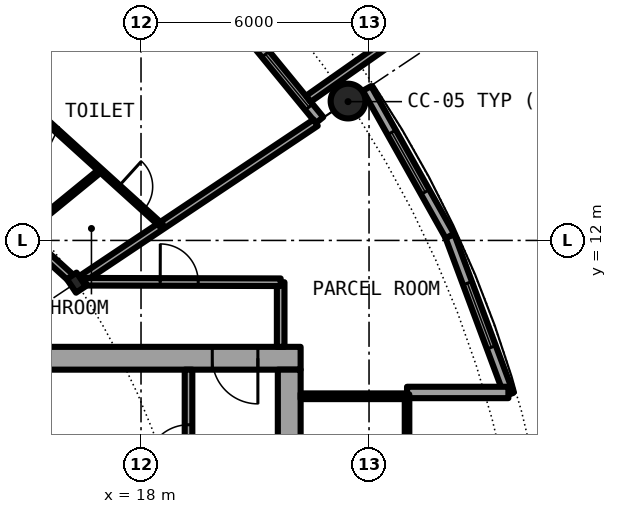
"""IFC4 building model, lengths in metres.
Left out: names, types, materials, properties, quantities, classifications, styles, units other than length and angle.
Written with IfcOpenShell. Run it as: python <this file> out.ifc"""

import sys

from ifc_helpers import new_model, si_unit, direction, frame, frame_2d, origin, origin_2d, place, context, subcontext, project, spatial, rectangle, hollow_circle, i_section, extrude, element, fill, save


model = new_model("IFC4")
c1 = context("Model", 3, precision=1e-05, world=origin(), true_north=direction((0.0, 1.0)))
c2 = subcontext(c1, "Body", "Model", "MODEL_VIEW")
j1 = project(units=[si_unit("LENGTHUNIT", "METRE"), si_unit("PLANEANGLEUNIT", "RADIAN")], contexts=[c1])
p1 = place(None, origin())
s1 = spatial("IfcSite", under=j1, at=p1, CompositionType="ELEMENT")
p2 = place(p1, origin())
s2 = spatial("IfcBuilding", under=s1, at=p2, CompositionType="ELEMENT")
p3 = place(p2, frame((0.0, 0.0, 129.95)))
s3 = spatial("IfcBuildingStorey", under=s2, at=p3, CompositionType="ELEMENT", Elevation=129.95)
p4 = place(p3, frame((23.448, 15.667, 0.0), z_axis=(0.0, 0.0, 1.0), x_axis=(1.0, 0.0, 0.0)))
e1 = element("IfcColumn", 1, at=p4, inside=s3, PredefinedType="COLUMN", context=c2, shape_type="SweptSolid", body=[
    extrude(hollow_circle(Radius=0.457, WallThickness=0.04, at=origin_2d()), origin(), (0.0, 0.0, 1.0), 3.05),
])
p5 = place(p3, frame((16.297, 10.889, 0.0), z_axis=(0.0, 0.0, 1.0), x_axis=(0.831469612303, 0.55557023302, 0.0)))
e2 = element("IfcColumn", 2, at=p5, inside=s3, PredefinedType="COLUMN", context=c2, shape_type="SweptSolid", body=[
    extrude(i_section(OverallWidth=0.307, OverallDepth=0.432, WebThickness=0.021, FlangeThickness=0.04, FilletRadius=0.027, at=origin_2d()), origin(), (0.0, 0.0, 1.0), 3.05),
])
p6 = place(p3, frame((22.699, 15.167, 0.0), z_axis=(0.0, 0.0, 1.0), x_axis=(-0.634382322723, 0.773019449054, 0.0)))
e3 = element("IfcWall", 3, at=p6, inside=s3, PredefinedType="SOLIDWALL", context=c2, shape_type="SweptSolid", body=[
    extrude(rectangle(XDim=5.352, YDim=0.25, at=frame_2d((2.676, 0.0))), origin(), (0.0, 0.0, 1.0), 2.7),
])
p7 = place(p6, frame((0.441, 0.0, 0.3)))
e4 = element("IfcOpeningElement", 4, at=p7, cuts=e3, PredefinedType="OPENING", context=c2, shape_type="SweptSolid", body=[
    extrude(rectangle(XDim=1.8, YDim=2.1, at=frame_2d((0.9, 1.05))), frame((0.0, 0.135, 0.0), z_axis=(0.0, -1.0, 0.0), x_axis=(1.0, 0.0, 0.0)), (0.0, 0.0, 1.0), 0.27),
])
p8 = place(p6, frame((3.51, 0.0, 0.0)))
e5 = element("IfcOpeningElement", 5, at=p8, cuts=e3, PredefinedType="OPENING", context=c2, shape_type="SweptSolid", body=[
    extrude(rectangle(XDim=1.0, YDim=2.2, at=frame_2d((0.5, 1.1))), frame((0.0, 0.135, 0.0), z_axis=(0.0, -1.0, 0.0), x_axis=(1.0, 0.0, 0.0)), (0.0, 0.0, 1.0), 0.27),
])
p9 = place(p3, frame((22.402, 15.726, -0.03), z_axis=(0.0, 0.0, 1.0), x_axis=(0.818275399393, 0.574826383135, 0.0)))
e6 = element("IfcWall", 6, at=p9, inside=s3, PredefinedType="SOLIDWALL", context=c2, shape_type="SweptSolid", body=[
    extrude(rectangle(XDim=2.929, YDim=0.2, at=frame_2d((1.465, 0.0))), origin(), (0.0, 0.0, 1.0), 2.73),
])
p10 = place(p3, frame((27.682, 7.945, 0.0), z_axis=(0.0, 0.0, 1.0), x_axis=(-0.349247811493, 0.937030397675, 0.0)))
e7 = element("IfcWall", 7, at=p10, inside=s3, PredefinedType="SOLIDWALL", context=c2, shape_type="SweptSolid", body=[
    extrude(rectangle(XDim=4.452, YDim=0.25, at=frame_2d((2.226, 0.0))), origin(), (0.0, 0.0, 1.0), 2.7),
])
p11 = place(p10, frame((1.327, 0.0, 0.3)))
e8 = element("IfcOpeningElement", 8, at=p11, cuts=e7, PredefinedType="OPENING", context=c2, shape_type="SweptSolid", body=[
    extrude(rectangle(XDim=1.8, YDim=2.1, at=frame_2d((0.9, 1.05))), frame((0.0, 0.135, 0.0), z_axis=(0.0, -1.0, 0.0), x_axis=(1.0, 0.0, 0.0)), (0.0, 0.0, 1.0), 0.27),
])
p12 = place(p3, frame((26.127, 12.117, 0.0), z_axis=(0.0, 0.0, 1.0), x_axis=(-0.489696356642, 0.871893042919, 0.0)))
e9 = element("IfcWall", 9, at=p12, inside=s3, PredefinedType="SOLIDWALL", context=c2, shape_type="SweptSolid", body=[
    extrude(rectangle(XDim=4.454, YDim=0.25, at=frame_2d((2.227, 0.0))), origin(), (0.0, 0.0, 1.0), 2.7),
])
p13 = place(p12, frame((1.327, 0.0, 0.3)))
e10 = element("IfcOpeningElement", 10, at=p13, cuts=e9, PredefinedType="OPENING", context=c2, shape_type="SweptSolid", body=[
    extrude(rectangle(XDim=1.8, YDim=2.1, at=frame_2d((0.9, 1.05))), frame((0.0, 0.135, 0.0), z_axis=(0.0, -1.0, 0.0), x_axis=(1.0, 0.0, 0.0)), (0.0, 0.0, 1.0), 0.27),
])
p14 = place(p3, frame((25.0, 8.0, 0.0), z_axis=(0.0, 0.0, 1.0), x_axis=(1.0, 0.0, 0.0)))
e11 = element("IfcWall", 11, at=p14, inside=s3, PredefinedType="SOLIDWALL", context=c2, shape_type="SweptSolid", body=[
    extrude(rectangle(XDim=2.667, YDim=0.3, at=frame_2d((1.333, 0.0))), origin(), (0.0, 0.0, 1.0), 2.7),
])
p15 = place(p3, frame((22.2, 8.9, 0.0), z_axis=(0.0, 0.0, 1.0), x_axis=(-1.0, 0.0, 0.0)))
e12 = element("IfcWall", 12, at=p15, inside=s3, PredefinedType="SHEAR", context=c2, shape_type="SweptSolid", body=[
    extrude(rectangle(XDim=13.8, YDim=0.6, at=frame_2d((6.9, 0.0))), origin(), (0.0, 0.0, 1.0), 3.05),
])
p16 = place(p15, frame((1.125, 0.0, 0.0)))
e13 = element("IfcOpeningElement", 13, at=p16, cuts=e12, PredefinedType="OPENING", context=c2, shape_type="SweptSolid", body=[
    extrude(rectangle(XDim=1.2, YDim=2.3, at=frame_2d((0.6, 1.15))), frame((0.0, 0.31, 0.0), z_axis=(0.0, -1.0, 0.0), x_axis=(1.0, 0.0, 0.0)), (0.0, 0.0, 1.0), 0.62),
])
p17 = place(p3, frame((21.9, 8.6, 0.0), z_axis=(0.0, 0.0, 1.0), x_axis=(0.0, -1.0, 0.0)))
e14 = element("IfcWall", 14, at=p17, inside=s3, PredefinedType="SHEAR", context=c2, shape_type="SweptSolid", body=[
    extrude(rectangle(XDim=17.2, YDim=0.6, at=frame_2d((8.6, 0.0))), origin(), (0.0, 0.0, 1.0), 3.05),
])
p18 = place(p17, frame((7.7, 0.0, 0.0)))
e15 = element("IfcOpeningElement", 15, at=p18, cuts=e14, PredefinedType="OPENING", context=c2, shape_type="SweptSolid", body=[
    extrude(rectangle(XDim=1.8, YDim=2.3, at=frame_2d((0.9, 1.15))), frame((0.0, 0.31, 0.0), z_axis=(0.0, -1.0, 0.0), x_axis=(1.0, 0.0, 0.0)), (0.0, 0.0, 1.0), 0.62),
])
p19 = place(p3, frame((19.25, 1.575, 0.0), z_axis=(0.0, 0.0, 1.0), x_axis=(0.0, 1.0, 0.0)))
e16 = element("IfcWall", 16, at=p19, inside=s3, PredefinedType="SOLIDWALL", context=c2, shape_type="SweptSolid", body=[
    extrude(rectangle(XDim=7.025, YDim=0.2, at=frame_2d((3.513, 0.0))), origin(), (0.0, 0.0, 1.0), 2.7),
])
p20 = place(p19, frame((4.475, 0.0, 0.0)))
e17 = element("IfcOpeningElement", 17, at=p20, cuts=e16, PredefinedType="OPENING", context=c2, shape_type="SweptSolid", body=[
    extrude(rectangle(XDim=1.1, YDim=2.3, at=frame_2d((0.55, 1.15))), frame((0.0, 0.11, 0.0), z_axis=(0.0, -1.0, 0.0), x_axis=(1.0, 0.0, 0.0)), (0.0, 0.0, 1.0), 0.22),
])
p21 = place(p3, frame((22.2, 7.9, 0.0), z_axis=(0.0, 0.0, 1.0), x_axis=(1.0, 0.0, 0.0)))
e18 = element("IfcWall", 18, at=p21, inside=s3, PredefinedType="PARTITIONING", context=c2, shape_type="SweptSolid", body=[
    extrude(rectangle(XDim=2.74, YDim=0.15, at=frame_2d((1.37, 0.0))), origin(), (0.0, 0.0, 1.0), 2.7),
])
p22 = place(p3, frame((25.0, -7.95, 0.0), z_axis=(0.0, 0.0, 1.0), x_axis=(0.0, 1.0, 0.0)))
e19 = element("IfcWall", 19, at=p22, inside=s3, PredefinedType="PARTITIONING", context=c2, shape_type="SweptSolid", body=[
    extrude(rectangle(XDim=15.9, YDim=0.12, at=frame_2d((7.95, 0.0))), origin(), (0.0, 0.0, 1.0), 2.7),
])
p23 = place(p22, frame((0.95, 0.0, 0.1)))
e20 = element("IfcOpeningElement", 20, at=p23, cuts=e19, PredefinedType="OPENING", context=c2, shape_type="SweptSolid", body=[
    extrude(rectangle(XDim=14.0, YDim=2.35, at=frame_2d((7.0, 1.175))), frame((0.0, 0.07, 0.0), z_axis=(0.0, -1.0, 0.0), x_axis=(1.0, 0.0, 0.0)), (0.0, 0.0, 1.0), 0.14),
])
p24 = place(p3, frame((21.675, 9.2, 0.0), z_axis=(0.0, 0.0, 1.0), x_axis=(0.0, 1.0, 0.0)))
e21 = element("IfcWall", 21, at=p24, inside=s3, PredefinedType="PARTITIONING", context=c2, shape_type="SweptSolid", body=[
    extrude(rectangle(XDim=1.7, YDim=0.2, at=frame_2d((0.85, 0.0))), origin(), (0.0, 0.0, 1.0), 2.7),
])
p25 = place(p3, frame((12.062, 14.727, 0.0), z_axis=(0.0, 0.0, 1.0), x_axis=(0.633664062855, 0.773608334654, 0.0)))
e22 = element("IfcWall", 22, at=p25, inside=s3, PredefinedType="PARTITIONING", context=c2, shape_type="SweptSolid", body=[
    extrude(rectangle(XDim=8.138, YDim=0.1, at=frame_2d((4.069, 0.0))), origin(), (0.0, 0.0, 1.0), 2.7),
])
p26 = place(p25, frame((0.861, 0.0, 0.0)))
e23 = element("IfcOpeningElement", 23, at=p26, cuts=e22, PredefinedType="OPENING", context=c2, shape_type="SweptSolid", body=[
    extrude(rectangle(XDim=0.9, YDim=2.3, at=frame_2d((0.45, 1.15))), frame((0.0, 0.06, 0.0), z_axis=(0.0, -1.0, 0.0), x_axis=(1.0, 0.0, 0.0)), (0.0, 0.0, 1.0), 0.12),
])
p27 = place(p25, frame((4.932, 0.0, 0.0)))
e24 = element("IfcOpeningElement", 24, at=p27, cuts=e22, PredefinedType="OPENING", context=c2, shape_type="SweptSolid", body=[
    extrude(rectangle(XDim=0.9, YDim=2.3, at=frame_2d((0.45, 1.15))), frame((0.0, 0.06, 0.0), z_axis=(0.0, -1.0, 0.0), x_axis=(1.0, 0.0, 0.0)), (0.0, 0.0, 1.0), 0.12),
])
p28 = place(p3, frame((14.885, 12.168, 0.0), z_axis=(0.0, 0.0, 1.0), x_axis=(0.774162545943, 0.632986850147, 0.0)))
e25 = element("IfcWall", 25, at=p28, inside=s3, PredefinedType="PARTITIONING", context=c2, shape_type="SweptSolid", body=[
    extrude(rectangle(XDim=2.649, YDim=0.1, at=frame_2d((1.325, 0.0))), origin(), (0.0, 0.0, 1.0), 2.7),
])
p29 = place(p3, frame((16.477, 11.009, 0.0), z_axis=(0.0, 0.0, 1.0), x_axis=(0.831406593008, 0.555664536482, 0.0)))
e26 = element("IfcWall", 26, at=p29, inside=s3, PredefinedType="PARTITIONING", context=c2, shape_type="SweptSolid", body=[
    extrude(rectangle(XDim=7.358, YDim=0.2, at=frame_2d((3.679, 0.0))), origin(), (0.0, 0.0, 1.0), 2.7),
])
p30 = place(p3, frame((16.54, 10.913, 0.0), z_axis=(0.0, 0.0, 1.0), x_axis=(0.99999670426, -0.002567385634, 0.0)))
e27 = element("IfcWall", 27, at=p30, inside=s3, PredefinedType="PARTITIONING", context=c2, shape_type="SweptSolid", body=[
    extrude(rectangle(XDim=5.135, YDim=0.2, at=frame_2d((2.567, 0.0))), origin(), (0.0, 0.0, 1.0), 2.7),
])
p31 = place(p30, frame((1.965, 0.0, 0.0)))
e28 = element("IfcOpeningElement", 28, at=p31, cuts=e27, PredefinedType="OPENING", context=c2, shape_type="SweptSolid", body=[
    extrude(rectangle(XDim=1.0, YDim=2.3, at=frame_2d((0.5, 1.15))), frame((0.0, 0.11, 0.0), z_axis=(0.0, -1.0, 0.0), x_axis=(1.0, 0.0, 0.0)), (0.0, 0.0, 1.0), 0.22),
])
p32 = place(p3, frame((13.531, 13.394, 0.0), z_axis=(0.0, 0.0, 1.0), x_axis=(0.741095315462, -0.671399831249, 0.0)))
e29 = element("IfcWall", 29, at=p32, inside=s3, PredefinedType="PARTITIONING", context=c2, shape_type="SweptSolid", body=[
    extrude(rectangle(XDim=3.573, YDim=0.2, at=frame_2d((1.787, 0.0))), origin(), (0.0, 0.0, 1.0), 2.39),
])
p33 = place(p3, frame((15.33, 15.3, 0.0), z_axis=(0.0, 0.0, 1.0), x_axis=(0.740948416939, -0.671561943112, 0.0)))
e30 = element("IfcWall", 30, at=p33, inside=s3, PredefinedType="PARTITIONING", context=c2, shape_type="SweptSolid", body=[
    extrude(rectangle(XDim=4.335, YDim=0.1, at=frame_2d((2.167, 0.0))), origin(), (0.0, 0.0, 1.0), 2.7),
])
p34 = place(p33, frame((2.803, 0.0, 0.0)))
e31 = element("IfcOpeningElement", 31, at=p34, cuts=e30, PredefinedType="OPENING", context=c2, shape_type="SweptSolid", body=[
    extrude(rectangle(XDim=0.9, YDim=2.3, at=frame_2d((0.45, 1.15))), frame((0.0, 0.06, 0.0), z_axis=(0.0, -1.0, 0.0), x_axis=(1.0, 0.0, 0.0)), (0.0, 0.0, 1.0), 0.12),
])
p35 = place(p7, origin())
e32 = element("IfcWindow", 32, at=p35, inside=s3, PartitioningType="SINGLE_PANEL", PredefinedType="WINDOW", context=c2, shape_type="SweptSolid", body=[
    extrude(rectangle(XDim=1.8, YDim=2.1, at=frame_2d((0.9, 1.05))), frame((0.0, 0.03, 0.0), z_axis=(0.0, -1.0, 0.0), x_axis=(1.0, 0.0, 0.0)), (0.0, 0.0, 1.0), 0.06),
])
fill(e4, e32)
p36 = place(p11, origin())
e33 = element("IfcWindow", 33, at=p36, inside=s3, PartitioningType="SINGLE_PANEL", PredefinedType="WINDOW", context=c2, shape_type="SweptSolid", body=[
    extrude(rectangle(XDim=1.8, YDim=2.1, at=frame_2d((0.9, 1.05))), frame((0.0, 0.03, 0.0), z_axis=(0.0, -1.0, 0.0), x_axis=(1.0, 0.0, 0.0)), (0.0, 0.0, 1.0), 0.06),
])
fill(e8, e33)
p37 = place(p13, origin())
e34 = element("IfcWindow", 34, at=p37, inside=s3, PartitioningType="SINGLE_PANEL", PredefinedType="WINDOW", context=c2, shape_type="SweptSolid", body=[
    extrude(rectangle(XDim=1.8, YDim=2.1, at=frame_2d((0.9, 1.05))), frame((0.0, 0.03, 0.0), z_axis=(0.0, -1.0, 0.0), x_axis=(1.0, 0.0, 0.0)), (0.0, 0.0, 1.0), 0.06),
])
fill(e10, e34)
p38 = place(p20, origin())
e35 = element("IfcDoor", 35, at=p38, inside=s3, OperationType="SINGLE_SWING_LEFT", PredefinedType="DOOR", context=c2, shape_type="SweptSolid", body=[
    extrude(rectangle(XDim=1.1, YDim=2.3, at=frame_2d((0.55, 1.15))), frame((0.0, 0.025, 0.0), z_axis=(0.0, -1.0, 0.0), x_axis=(1.0, 0.0, 0.0)), (0.0, 0.0, 1.0), 0.05),
])
fill(e17, e35)
p39 = place(p16, origin())
e36 = element("IfcDoor", 36, at=p39, inside=s3, OperationType="SINGLE_SWING_RIGHT", PredefinedType="DOOR", context=c2, shape_type="SweptSolid", body=[
    extrude(rectangle(XDim=1.2, YDim=2.3, at=frame_2d((0.6, 1.15))), frame((0.0, 0.025, 0.0), z_axis=(0.0, -1.0, 0.0), x_axis=(1.0, 0.0, 0.0)), (0.0, 0.0, 1.0), 0.05),
])
fill(e13, e36)
p40 = place(p23, origin())
e37 = element("IfcWindow", 37, at=p40, inside=s3, PartitioningType="SINGLE_PANEL", PredefinedType="WINDOW", context=c2, shape_type="SweptSolid", body=[
    extrude(rectangle(XDim=14.0, YDim=2.35, at=frame_2d((7.0, 1.175))), frame((0.0, 0.03, 0.0), z_axis=(0.0, -1.0, 0.0), x_axis=(1.0, 0.0, 0.0)), (0.0, 0.0, 1.0), 0.06),
])
fill(e20, e37)
p41 = place(p34, origin())
e38 = element("IfcDoor", 38, at=p41, inside=s3, OperationType="SINGLE_SWING_RIGHT", PredefinedType="DOOR", context=c2, shape_type="SweptSolid", body=[
    extrude(rectangle(XDim=0.9, YDim=2.3, at=frame_2d((0.45, 1.15))), frame((0.0, 0.025, 0.0), z_axis=(0.0, -1.0, 0.0), x_axis=(1.0, 0.0, 0.0)), (0.0, 0.0, 1.0), 0.05),
])
fill(e31, e38)
p42 = place(p31, origin())
e39 = element("IfcDoor", 39, at=p42, inside=s3, OperationType="SINGLE_SWING_LEFT", PredefinedType="DOOR", context=c2, shape_type="SweptSolid", body=[
    extrude(rectangle(XDim=1.0, YDim=2.3, at=frame_2d((0.5, 1.15))), frame((0.0, 0.025, 0.0), z_axis=(0.0, -1.0, 0.0), x_axis=(1.0, 0.0, 0.0)), (0.0, 0.0, 1.0), 0.05),
])
fill(e28, e39)
save(model, sys.argv[1])
